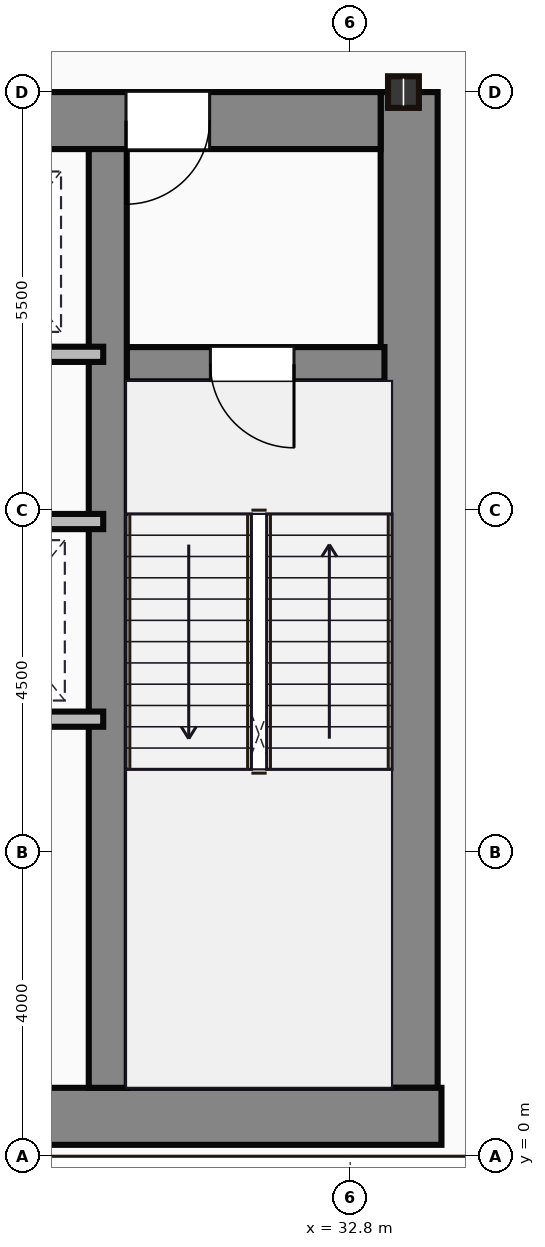
"""IFC4 building model, lengths in metres.
Left out: names, types, materials, properties, quantities, classifications, styles, units other than length and angle.
Written with IfcOpenShell. Run it as: python <this file> out.ifc"""

import sys

from ifc_helpers import new_model, si_unit, direction, frame, frame_2d, origin, origin_2d, place, context, subcontext, project, spatial, rectangle, i_section, extrude, source, transform, mapped, element, fill, save


model = new_model("IFC4")
c1 = context("Model", 3, precision=1e-05, world=origin(), true_north=direction((0.0, 1.0)))
c2 = subcontext(c1, "Body", "Model", "MODEL_VIEW")
j1 = project(units=[si_unit("LENGTHUNIT", "METRE"), si_unit("PLANEANGLEUNIT", "RADIAN")], contexts=[c1])
p1 = place(None, origin())
s1 = spatial("IfcSite", under=j1, at=p1, CompositionType="ELEMENT")
p2 = place(p1, origin())
s2 = spatial("IfcBuilding", under=s1, at=p2, CompositionType="ELEMENT")
p3 = place(p2, frame((0.0, 0.0, 84.15)))
s3 = spatial("IfcBuildingStorey", under=s2, at=p3, CompositionType="ELEMENT", Elevation=84.15)
m1 = source(origin(), c2, "Body", "SweptSolid", [
    extrude(rectangle(XDim=29.5, YDim=0.75, at=frame_2d((14.75, 0.0))), origin(), (0.0, 0.0, 1.0), 4.5),
])
p4 = place(p3, frame((4.5, 0.525, 0.0), z_axis=(0.0, 0.0, 1.0), x_axis=(1.0, 0.0, 0.0)))
e1 = element("IfcWall", 1, at=p4, inside=s3, PredefinedType="SHEAR", context=c2, shape_type="MappedRepresentation", body=[
    mapped(m1, transform((0.0, 0.0, 0.0))),
])
m2 = source(origin(), c2, "Body", "SweptSolid", [
    extrude(rectangle(XDim=13.1, YDim=0.75, at=frame_2d((6.55, 0.0))), origin(), (0.0, 0.0, 1.0), 4.5),
])
p5 = place(p3, frame((33.575, 0.9, 0.0), z_axis=(0.0, 0.0, 1.0), x_axis=(0.0, 1.0, 0.0)))
e2 = element("IfcWall", 2, at=p5, inside=s3, PredefinedType="SHEAR", context=c2, shape_type="MappedRepresentation", body=[
    mapped(m2, transform((0.0, 0.0, 0.0))),
])
m3 = source(origin(), c2, "Body", "SweptSolid", [
    extrude(rectangle(XDim=12.6, YDim=0.75, at=frame_2d((6.3, 0.0))), origin(), (0.0, 0.0, 1.0), 4.5),
])
p6 = place(p3, frame((20.6, 13.625, 0.0), z_axis=(0.0, 0.0, 1.0), x_axis=(1.0, 0.0, 0.0)))
e3 = element("IfcWall", 3, at=p6, inside=s3, PredefinedType="SHEAR", context=c2, shape_type="MappedRepresentation", body=[
    mapped(m3, transform((0.0, 0.0, 0.0))),
])
p7 = place(p6, frame((9.25, 0.0, 0.0)))
e4 = element("IfcOpeningElement", 4, at=p7, cuts=e3, PredefinedType="OPENING", context=c2, shape_type="SweptSolid", body=[
    extrude(rectangle(XDim=1.1, YDim=2.15, at=frame_2d((0.55, 1.075))), frame((0.0, 0.385, 0.0), z_axis=(0.0, -1.0, 0.0), x_axis=(1.0, 0.0, 0.0)), (0.0, 0.0, 1.0), 0.77),
])
m4 = source(origin(), c2, "Body", "SweptSolid", [
    extrude(rectangle(XDim=12.35, YDim=0.5, at=frame_2d((6.175, 0.0))), origin(), (0.0, 0.0, 1.0), 4.5),
])
p8 = place(p3, frame((29.61, 0.9, 0.0), z_axis=(0.0, 0.0, 1.0), x_axis=(0.0, 1.0, 0.0)))
e5 = element("IfcWall", 5, at=p8, inside=s3, PredefinedType="SHEAR", context=c2, shape_type="MappedRepresentation", body=[
    mapped(m4, transform((0.0, 0.0, 0.0))),
])
m5 = source(origin(), c2, "Body", "SweptSolid", [
    extrude(rectangle(XDim=3.39, YDim=0.45, at=frame_2d((1.695, 0.0))), origin(), (0.0, 0.0, 1.0), 4.5),
])
p9 = place(p3, frame((29.86, 10.42, 0.0), z_axis=(0.0, 0.0, 1.0), x_axis=(1.0, 0.0, 0.0)))
e6 = element("IfcWall", 6, at=p9, inside=s3, PredefinedType="SHEAR", context=c2, shape_type="MappedRepresentation", body=[
    mapped(m5, transform((0.0, 0.0, 0.0))),
])
p10 = place(p9, frame((1.1, 0.0, 0.0)))
e7 = element("IfcOpeningElement", 7, at=p10, cuts=e6, PredefinedType="OPENING", context=c2, shape_type="SweptSolid", body=[
    extrude(rectangle(XDim=1.1, YDim=2.15, at=frame_2d((0.55, 1.075))), frame((0.0, 0.235, 0.0), z_axis=(0.0, -1.0, 0.0), x_axis=(1.0, 0.0, 0.0)), (0.0, 0.0, 1.0), 0.47),
])
m6 = source(origin(), c2, "Body", "SweptSolid", [
    extrude(i_section(OverallWidth=0.406, OverallDepth=0.416, WebThickness=0.03, FlangeThickness=0.048, at=origin_2d()), origin(), (0.0, 0.0, 1.0), 4.5),
])
p11 = place(p3, frame((33.5, 14.0, 0.0), z_axis=(0.0, 0.0, 1.0), x_axis=(1.0, 0.0, 0.0)))
e8 = element("IfcColumn", 8, at=p11, inside=s3, PredefinedType="COLUMN", context=c2, shape_type="MappedRepresentation", body=[
    mapped(m6, transform((0.0, 0.0, 0.0))),
])
m7 = source(origin(), c2, "Body", "SweptSolid", [
    extrude(rectangle(XDim=8.8, YDim=0.2, at=frame_2d((4.4, 0.0))), origin(), (0.0, 0.0, 1.0), 4.25),
])
p12 = place(p3, frame((20.75, 10.55, 0.0), z_axis=(0.0, 0.0, 1.0), x_axis=(1.0, 0.0, 0.0)))
e9 = element("IfcWall", 9, at=p12, inside=s3, PredefinedType="PARTITIONING", context=c2, shape_type="MappedRepresentation", body=[
    mapped(m7, transform((0.0, 0.0, 0.0))),
])
m8 = source(origin(), c2, "Body", "SweptSolid", [
    extrude(rectangle(XDim=4.55, YDim=0.2, at=frame_2d((2.275, 0.0))), origin(), (0.0, 0.0, 1.0), 4.25),
])
for number, where, z_axis, x_axis in (
    (10, (25.0, 8.35, 0.0), (0.0, 0.0, 1.0), (1.0, 0.0, 0.0)),
    (11, (25.0, 5.75, 0.0), (0.0, 0.0, 1.0), (1.0, 0.0, 0.0)),
):
    element("IfcWall", number, at=place(p3, frame(where, z_axis=z_axis, x_axis=x_axis)), inside=s3, PredefinedType="PARTITIONING", context=c2, shape_type="MappedRepresentation", body=[
        mapped(m8, transform((0.0, 0.0, 0.0))),
    ])
m9 = source(origin(), c2, "Body", "SweptSolid", [
    extrude(rectangle(XDim=1.1, YDim=2.15, at=frame_2d((0.55, 1.075))), frame((0.0, 0.025, 0.0), z_axis=(0.0, -1.0, 0.0), x_axis=(1.0, 0.0, 0.0)), (0.0, 0.0, 1.0), 0.05),
])
p13 = place(p10, frame((1.1, 0.0, 0.0), z_axis=(0.0, 0.0, 1.0), x_axis=(-1.0, 0.0, 0.0)))
e12 = element("IfcDoor", 12, at=p13, inside=s3, OperationType="SINGLE_SWING_RIGHT", PredefinedType="DOOR", context=c2, shape_type="MappedRepresentation", body=[
    mapped(m9, transform((0.0, 0.0, 0.0))),
])
fill(e7, e12)
p14 = place(p7, origin())
e13 = element("IfcDoor", 13, at=p14, inside=s3, OperationType="SINGLE_SWING_LEFT", PredefinedType="DOOR", context=c2, shape_type="MappedRepresentation", body=[
    mapped(m9, transform((0.0, 0.0, 0.0))),
])
fill(e4, e13)
save(model, sys.argv[1])
